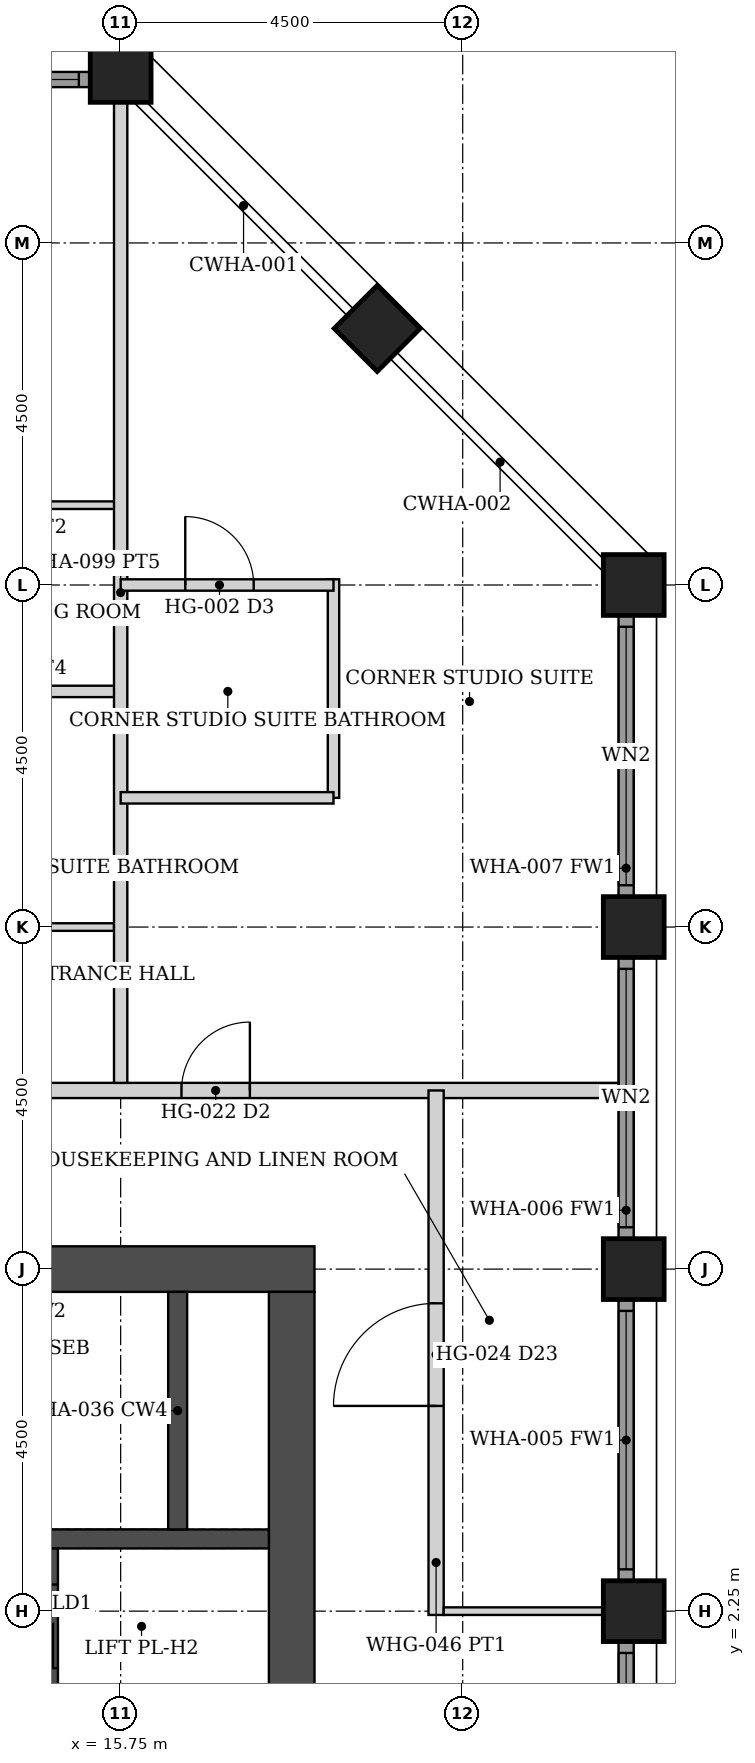
"""IFC4 building model, lengths in metres.
Left out: names, types, materials, properties, quantities, classifications, styles, units other than length and angle.
Written with IfcOpenShell. Run it as: python <this file> out.ifc"""

import sys

from ifc_helpers import new_model, si_unit, direction, frame, frame_2d, origin, origin_2d, place, context, subcontext, project, spatial, rectangle, hollow_rectangle, extrude, element, fill, save


model = new_model("IFC4")
c1 = context("Model", 3, precision=1e-05, world=origin(), true_north=direction((0.0, 1.0)))
c2 = subcontext(c1, "Body", "Model", "MODEL_VIEW")
j1 = project(units=[si_unit("LENGTHUNIT", "METRE"), si_unit("PLANEANGLEUNIT", "RADIAN")], contexts=[c1])
p1 = place(None, origin())
s1 = spatial("IfcSite", under=j1, at=p1, CompositionType="ELEMENT")
p2 = place(p1, origin())
s2 = spatial("IfcBuilding", under=s1, at=p2, CompositionType="ELEMENT")
p3 = place(p2, frame((0.0, 0.0, 183.2)))
s3 = spatial("IfcBuildingStorey", under=s2, at=p3, CompositionType="ELEMENT", Elevation=183.2)
for number, where, z_axis, x_axis in (
    (1, (22.5, 2.25, 0.0), (0.0, 0.0, 1.0), (1.0, 0.0, 0.0)),
    (2, (22.5, 6.75, 0.0), (0.0, 0.0, 1.0), (1.0, 0.0, 0.0)),
    (3, (22.5, 11.25, 0.0), (0.0, 0.0, 1.0), (1.0, 0.0, 0.0)),
    (4, (15.75, 22.5, 0.0), (0.0, 0.0, 1.0), (0.0, 1.0, 0.0)),
    (5, (22.5, 15.75, 0.0), (0.0, 0.0, 1.0), (1.0, 0.0, 0.0)),
    (6, (19.125, 19.125, 0.0), (0.0, 0.0, 1.0), (0.707, 0.707, 0.0)),
):
    element("IfcColumn", number, at=place(p3, frame(where, z_axis=z_axis, x_axis=x_axis)), inside=s3, PredefinedType="COLUMN", context=c2, shape_type="SweptSolid", body=[
        extrude(hollow_rectangle(XDim=0.8, YDim=0.8, WallThickness=0.045, at=origin_2d()), origin(), (0.0, 0.0, 1.0), 3.6),
    ])
p4 = place(p3, frame((8.7, 6.75, 0.0), z_axis=(0.0, 0.0, 1.0), x_axis=(1.0, 0.0, 0.0)))
e7 = element("IfcWall", 7, at=p4, inside=s3, PredefinedType="SHEAR", context=c2, shape_type="SweptSolid", body=[
    extrude(rectangle(XDim=9.6, YDim=0.6, at=frame_2d((4.8, 0.0))), origin(), (0.0, 0.0, 1.0), 3.6),
])
p5 = place(p3, frame((18.0, -6.45, 0.0), z_axis=(0.0, 0.0, 1.0), x_axis=(0.0, 1.0, 0.0)))
e8 = element("IfcWall", 8, at=p5, inside=s3, PredefinedType="SHEAR", context=c2, shape_type="SweptSolid", body=[
    extrude(rectangle(XDim=12.9, YDim=0.6, at=frame_2d((6.45, 0.0))), origin(), (0.0, 0.0, 1.0), 3.6),
])
p6 = place(p3, frame((9.3, 3.2, 0.0), z_axis=(0.0, 0.0, 1.0), x_axis=(1.0, 0.0, 0.0)))
e9 = element("IfcWall", 9, at=p6, inside=s3, PredefinedType="SHEAR", context=c2, shape_type="SweptSolid", body=[
    extrude(rectangle(XDim=8.4, YDim=0.25, at=frame_2d((4.2, 0.0))), origin(), (0.0, 0.0, 1.0), 3.6),
])
p7 = place(p3, frame((16.5, 3.325, 0.0), z_axis=(0.0, 0.0, 1.0), x_axis=(0.0, 1.0, 0.0)))
e10 = element("IfcWall", 10, at=p7, inside=s3, PredefinedType="SHEAR", context=c2, shape_type="SweptSolid", body=[
    extrude(rectangle(XDim=3.125, YDim=0.25, at=frame_2d((1.562, 0.0))), origin(), (0.0, 0.0, 1.0), 3.6),
])
p8 = place(p3, frame((14.8, -3.075, 0.0), z_axis=(0.0, 0.0, 1.0), x_axis=(0.0, 1.0, 0.0)))
e11 = element("IfcWall", 11, at=p8, inside=s3, PredefinedType="SHEAR", context=c2, shape_type="SweptSolid", body=[
    extrude(rectangle(XDim=6.15, YDim=0.25, at=frame_2d((3.075, 0.0))), origin(), (0.0, 0.0, 1.0), 3.6),
])
p9 = place(p8, frame((2.4, 0.0, 0.0)))
e12 = element("IfcOpeningElement", 12, at=p9, cuts=e11, PredefinedType="OPENING", context=c2, shape_type="SweptSolid", body=[
    extrude(rectangle(XDim=1.1, YDim=2.1, at=frame_2d((0.55, 1.05))), frame((0.0, 0.135, 0.0), z_axis=(0.0, -1.0, 0.0), x_axis=(1.0, 0.0, 0.0)), (0.0, 0.0, 1.0), 0.27),
])
p10 = place(p8, frame((4.575, 0.0, 0.0)))
e13 = element("IfcOpeningElement", 13, at=p10, cuts=e11, PredefinedType="OPENING", context=c2, shape_type="SweptSolid", body=[
    extrude(rectangle(XDim=1.1, YDim=2.1, at=frame_2d((0.55, 1.05))), frame((0.0, 0.135, 0.0), z_axis=(0.0, -1.0, 0.0), x_axis=(1.0, 0.0, 0.0)), (0.0, 0.0, 1.0), 0.27),
])
p11 = place(p3, frame((22.4, -1.845, 0.0), z_axis=(0.0, 0.0, 1.0), x_axis=(0.0, 1.0, 0.0)))
e14 = element("IfcWall", 14, at=p11, inside=s3, PredefinedType="SOLIDWALL", context=c2, shape_type="SweptSolid", body=[
    extrude(rectangle(XDim=3.69, YDim=0.2, at=frame_2d((1.845, 0.0))), origin(), (0.0, 0.0, 1.0), 2.479),
])
p12 = place(p11, frame((0.145, 0.0, 0.3)))
e15 = element("IfcOpeningElement", 15, at=p12, cuts=e14, PredefinedType="OPENING", context=c2, shape_type="SweptSolid", body=[
    extrude(rectangle(XDim=3.4, YDim=2.029, at=frame_2d((1.7, 1.015))), frame((0.0, 0.11, 0.0), z_axis=(0.0, -1.0, 0.0), x_axis=(1.0, 0.0, 0.0)), (0.0, 0.0, 1.0), 0.22),
])
p13 = place(p3, frame((22.4, 2.655, 0.0), z_axis=(0.0, 0.0, 1.0), x_axis=(0.0, 1.0, 0.0)))
e16 = element("IfcWall", 16, at=p13, inside=s3, PredefinedType="SOLIDWALL", context=c2, shape_type="SweptSolid", body=[
    extrude(rectangle(XDim=3.69, YDim=0.2, at=frame_2d((1.845, 0.0))), origin(), (0.0, 0.0, 1.0), 2.479),
])
p14 = place(p13, frame((0.145, 0.0, 0.3)))
e17 = element("IfcOpeningElement", 17, at=p14, cuts=e16, PredefinedType="OPENING", context=c2, shape_type="SweptSolid", body=[
    extrude(rectangle(XDim=3.4, YDim=2.029, at=frame_2d((1.7, 1.015))), frame((0.0, 0.11, 0.0), z_axis=(0.0, -1.0, 0.0), x_axis=(1.0, 0.0, 0.0)), (0.0, 0.0, 1.0), 0.22),
])
p15 = place(p3, frame((22.4, 7.155, 0.0), z_axis=(0.0, 0.0, 1.0), x_axis=(0.0, 1.0, 0.0)))
e18 = element("IfcWall", 18, at=p15, inside=s3, PredefinedType="SOLIDWALL", context=c2, shape_type="SweptSolid", body=[
    extrude(rectangle(XDim=3.69, YDim=0.2, at=frame_2d((1.845, 0.0))), origin(), (0.0, 0.0, 1.0), 2.479),
])
p16 = place(p15, frame((0.145, 0.0, 0.3)))
e19 = element("IfcOpeningElement", 19, at=p16, cuts=e18, PredefinedType="OPENING", context=c2, shape_type="SweptSolid", body=[
    extrude(rectangle(XDim=3.4, YDim=2.029, at=frame_2d((1.7, 1.015))), frame((0.0, 0.11, 0.0), z_axis=(0.0, -1.0, 0.0), x_axis=(1.0, 0.0, 0.0)), (0.0, 0.0, 1.0), 0.22),
])
p17 = place(p3, frame((22.4, 11.655, 0.0), z_axis=(0.0, 0.0, 1.0), x_axis=(0.0, 1.0, 0.0)))
e20 = element("IfcWall", 20, at=p17, inside=s3, PredefinedType="SOLIDWALL", context=c2, shape_type="SweptSolid", body=[
    extrude(rectangle(XDim=3.69, YDim=0.2, at=frame_2d((1.845, 0.0))), origin(), (0.0, 0.0, 1.0), 2.479),
])
p18 = place(p17, frame((0.145, 0.0, 0.3)))
e21 = element("IfcOpeningElement", 21, at=p18, cuts=e20, PredefinedType="OPENING", context=c2, shape_type="SweptSolid", body=[
    extrude(rectangle(XDim=3.4, YDim=2.029, at=frame_2d((1.7, 1.015))), frame((0.0, 0.11, 0.0), z_axis=(0.0, -1.0, 0.0), x_axis=(1.0, 0.0, 0.0)), (0.0, 0.0, 1.0), 0.22),
])
p19 = place(p3, frame((11.655, 22.4, 0.0), z_axis=(0.0, 0.0, 1.0), x_axis=(1.0, 0.0, 0.0)))
e22 = element("IfcWall", 22, at=p19, inside=s3, PredefinedType="SOLIDWALL", context=c2, shape_type="SweptSolid", body=[
    extrude(rectangle(XDim=3.69, YDim=0.2, at=frame_2d((1.845, 0.0))), origin(), (0.0, 0.0, 1.0), 2.479),
])
p20 = place(p19, frame((0.145, 0.0, 0.3)))
e23 = element("IfcOpeningElement", 23, at=p20, cuts=e22, PredefinedType="OPENING", context=c2, shape_type="SweptSolid", body=[
    extrude(rectangle(XDim=3.4, YDim=2.029, at=frame_2d((1.7, 1.015))), frame((0.0, 0.11, 0.0), z_axis=(0.0, -1.0, 0.0), x_axis=(1.0, 0.0, 0.0)), (0.0, 0.0, 1.0), 0.22),
])
p21 = place(p3, frame((-22.3, 9.1, 0.0), z_axis=(0.0, 0.0, 1.0), x_axis=(1.0, 0.0, 0.0)))
e24 = element("IfcWall", 24, at=p21, inside=s3, PredefinedType="PARTITIONING", context=c2, shape_type="SweptSolid", body=[
    extrude(rectangle(XDim=44.6, YDim=0.2, at=frame_2d((22.3, 0.0))), origin(), (0.0, 0.0, 1.0), 2.473),
])
p22 = place(p21, frame((11.35, 0.0, 0.0)))
e25 = element("IfcOpeningElement", 25, at=p22, cuts=e24, PredefinedType="OPENING", context=c2, shape_type="SweptSolid", body=[
    extrude(rectangle(XDim=0.9, YDim=2.1, at=frame_2d((0.45, 1.05))), frame((0.0, 0.11, 0.0), z_axis=(0.0, -1.0, 0.0), x_axis=(1.0, 0.0, 0.0)), (0.0, 0.0, 1.0), 0.22),
])
p23 = place(p21, frame((15.75, 0.0, 0.0)))
e26 = element("IfcOpeningElement", 26, at=p23, cuts=e24, PredefinedType="OPENING", context=c2, shape_type="SweptSolid", body=[
    extrude(rectangle(XDim=0.9, YDim=2.1, at=frame_2d((0.45, 1.05))), frame((0.0, 0.11, 0.0), z_axis=(0.0, -1.0, 0.0), x_axis=(1.0, 0.0, 0.0)), (0.0, 0.0, 1.0), 0.22),
])
p24 = place(p21, frame((23.45, 0.0, 0.0)))
e27 = element("IfcOpeningElement", 27, at=p24, cuts=e24, PredefinedType="OPENING", context=c2, shape_type="SweptSolid", body=[
    extrude(rectangle(XDim=0.9, YDim=2.1, at=frame_2d((0.45, 1.05))), frame((0.0, 0.11, 0.0), z_axis=(0.0, -1.0, 0.0), x_axis=(1.0, 0.0, 0.0)), (0.0, 0.0, 1.0), 0.22),
])
p25 = place(p21, frame((24.75, 0.0, 0.0)))
e28 = element("IfcOpeningElement", 28, at=p25, cuts=e24, PredefinedType="OPENING", context=c2, shape_type="SweptSolid", body=[
    extrude(rectangle(XDim=0.9, YDim=2.1, at=frame_2d((0.45, 1.05))), frame((0.0, 0.11, 0.0), z_axis=(0.0, -1.0, 0.0), x_axis=(1.0, 0.0, 0.0)), (0.0, 0.0, 1.0), 0.22),
])
p26 = place(p21, frame((29.35, 0.0, 0.0)))
e29 = element("IfcOpeningElement", 29, at=p26, cuts=e24, PredefinedType="OPENING", context=c2, shape_type="SweptSolid", body=[
    extrude(rectangle(XDim=0.9, YDim=2.1, at=frame_2d((0.45, 1.05))), frame((0.0, 0.11, 0.0), z_axis=(0.0, -1.0, 0.0), x_axis=(1.0, 0.0, 0.0)), (0.0, 0.0, 1.0), 0.22),
])
p27 = place(p21, frame((38.85, 0.0, 0.0)))
e30 = element("IfcOpeningElement", 30, at=p27, cuts=e24, PredefinedType="OPENING", context=c2, shape_type="SweptSolid", body=[
    extrude(rectangle(XDim=0.9, YDim=2.1, at=frame_2d((0.45, 1.05))), frame((0.0, 0.11, 0.0), z_axis=(0.0, -1.0, 0.0), x_axis=(1.0, 0.0, 0.0)), (0.0, 0.0, 1.0), 0.22),
])
p28 = place(p21, frame((4.85, 0.0, 0.0)))
e31 = element("IfcOpeningElement", 31, at=p28, cuts=e24, PredefinedType="OPENING", context=c2, shape_type="SweptSolid", body=[
    extrude(rectangle(XDim=0.9, YDim=2.1, at=frame_2d((0.45, 1.05))), frame((0.0, 0.11, 0.0), z_axis=(0.0, -1.0, 0.0), x_axis=(1.0, 0.0, 0.0)), (0.0, 0.0, 1.0), 0.22),
])
p29 = place(p3, frame((19.9, 2.2, 0.0), z_axis=(0.0, 0.0, 1.0), x_axis=(0.0, 1.0, 0.0)))
e32 = element("IfcWall", 32, at=p29, inside=s3, PredefinedType="PARTITIONING", context=c2, shape_type="SweptSolid", body=[
    extrude(rectangle(XDim=6.9, YDim=0.2, at=frame_2d((3.45, 0.0))), origin(), (0.0, 0.0, 1.0), 2.473),
])
p30 = place(p29, frame((2.75, 0.0, 0.0)))
e33 = element("IfcOpeningElement", 33, at=p30, cuts=e32, PredefinedType="OPENING", context=c2, shape_type="SweptSolid", body=[
    extrude(rectangle(XDim=1.35, YDim=2.1, at=frame_2d((0.675, 1.05))), frame((0.0, 0.11, 0.0), z_axis=(0.0, -1.0, 0.0), x_axis=(1.0, 0.0, 0.0)), (0.0, 0.0, 1.0), 0.22),
])
p31 = place(p3, frame((6.837, 11.25, 0.0), z_axis=(0.0, 0.0, 1.0), x_axis=(1.0, 0.0, 0.0)))
e34 = element("IfcWall", 34, at=p31, inside=s3, PredefinedType="PARTITIONING", context=c2, shape_type="SweptSolid", body=[
    extrude(rectangle(XDim=8.825, YDim=0.1, at=frame_2d((4.413, 0.0))), origin(), (0.0, 0.0, 1.0), 2.473),
])
p32 = place(p31, frame((0.863, 0.0, 0.0)))
e35 = element("IfcOpeningElement", 35, at=p32, cuts=e34, PredefinedType="OPENING", context=c2, shape_type="SweptSolid", body=[
    extrude(rectangle(XDim=0.9, YDim=2.1, at=frame_2d((0.45, 1.05))), frame((0.0, 0.06, 0.0), z_axis=(0.0, -1.0, 0.0), x_axis=(1.0, 0.0, 0.0)), (0.0, 0.0, 1.0), 0.12),
])
p33 = place(p31, frame((3.113, 0.0, 0.0)))
e36 = element("IfcOpeningElement", 36, at=p33, cuts=e34, PredefinedType="OPENING", context=c2, shape_type="SweptSolid", body=[
    extrude(rectangle(XDim=0.9, YDim=2.1, at=frame_2d((0.45, 1.05))), frame((0.0, 0.06, 0.0), z_axis=(0.0, -1.0, 0.0), x_axis=(1.0, 0.0, 0.0)), (0.0, 0.0, 1.0), 0.12),
])
p34 = place(p31, frame((4.637, 0.0, 0.0)))
e37 = element("IfcOpeningElement", 37, at=p34, cuts=e34, PredefinedType="OPENING", context=c2, shape_type="SweptSolid", body=[
    extrude(rectangle(XDim=0.85, YDim=2.1, at=frame_2d((0.425, 1.05))), frame((0.0, 0.06, 0.0), z_axis=(0.0, -1.0, 0.0), x_axis=(1.0, 0.0, 0.0)), (0.0, 0.0, 1.0), 0.12),
])
p35 = place(p3, frame((12.55, 14.35, 0.0), z_axis=(0.0, 0.0, 1.0), x_axis=(1.0, 0.0, 0.0)))
e38 = element("IfcWall", 38, at=p35, inside=s3, PredefinedType="PARTITIONING", context=c2, shape_type="SweptSolid", body=[
    extrude(rectangle(XDim=3.14, YDim=0.15, at=frame_2d((1.57, 0.0))), origin(), (0.0, 0.0, 1.0), 2.473),
])
p36 = place(p3, frame((12.55, 16.8, 0.0), z_axis=(0.0, 0.0, 1.0), x_axis=(1.0, 0.0, 0.0)))
e39 = element("IfcWall", 39, at=p36, inside=s3, PredefinedType="PARTITIONING", context=c2, shape_type="SweptSolid", body=[
    extrude(rectangle(XDim=3.14, YDim=0.1, at=frame_2d((1.57, 0.0))), origin(), (0.0, 0.0, 1.0), 2.473),
])
p37 = place(p3, frame((15.75, 9.2, 0.0), z_axis=(0.0, 0.0, 1.0), x_axis=(0.0, 1.0, 0.0)))
e40 = element("IfcWall", 40, at=p37, inside=s3, PredefinedType="PARTITIONING", context=c2, shape_type="SweptSolid", body=[
    extrude(rectangle(XDim=12.9, YDim=0.175, at=frame_2d((6.45, 0.0))), origin(), (0.0, 0.0, 1.0), 2.473),
])
p38 = place(p3, frame((18.55, 12.95, 0.0), z_axis=(0.0, 0.0, 1.0), x_axis=(0.0, 1.0, 0.0)))
e41 = element("IfcWall", 41, at=p38, inside=s3, PredefinedType="PARTITIONING", context=c2, shape_type="SweptSolid", body=[
    extrude(rectangle(XDim=2.875, YDim=0.15, at=frame_2d((1.438, 0.0))), origin(), (0.0, 0.0, 1.0), 2.473),
])
p39 = place(p3, frame((15.75, 12.95, 0.0), z_axis=(0.0, 0.0, 1.0), x_axis=(1.0, 0.0, 0.0)))
e42 = element("IfcWall", 42, at=p39, inside=s3, PredefinedType="PARTITIONING", context=c2, shape_type="SweptSolid", body=[
    extrude(rectangle(XDim=2.8, YDim=0.15, at=frame_2d((1.4, 0.0))), origin(), (0.0, 0.0, 1.0), 2.473),
])
p40 = place(p3, frame((15.75, 15.75, 0.0), z_axis=(0.0, 0.0, 1.0), x_axis=(1.0, 0.0, 0.0)))
e43 = element("IfcWall", 43, at=p40, inside=s3, PredefinedType="PARTITIONING", context=c2, shape_type="SweptSolid", body=[
    extrude(rectangle(XDim=2.8, YDim=0.15, at=frame_2d((1.4, 0.0))), origin(), (0.0, 0.0, 1.0), 2.473),
])
p41 = place(p40, frame((0.85, 0.0, 0.0)))
e44 = element("IfcOpeningElement", 44, at=p41, cuts=e43, PredefinedType="OPENING", context=c2, shape_type="SweptSolid", body=[
    extrude(rectangle(XDim=0.9, YDim=2.1, at=frame_2d((0.45, 1.05))), frame((0.0, 0.085, 0.0), z_axis=(0.0, -1.0, 0.0), x_axis=(1.0, 0.0, 0.0)), (0.0, 0.0, 1.0), 0.17),
])
p42 = place(p3, frame((20.0, 2.25, 0.0), z_axis=(0.0, 0.0, 1.0), x_axis=(1.0, 0.0, 0.0)))
e45 = element("IfcWall", 45, at=p42, inside=s3, PredefinedType="PARTITIONING", context=c2, shape_type="SweptSolid", body=[
    extrude(rectangle(XDim=2.1, YDim=0.1, at=frame_2d((1.05, 0.0))), origin(), (0.0, 0.0, 1.0), 2.473),
])
p43 = place(p12, origin())
e46 = element("IfcWindow", 46, at=p43, inside=s3, PartitioningType="SINGLE_PANEL", PredefinedType="WINDOW", context=c2, shape_type="SweptSolid", body=[
    extrude(rectangle(XDim=3.4, YDim=2.029, at=frame_2d((1.7, 1.015))), frame((0.0, 0.03, 0.0), z_axis=(0.0, -1.0, 0.0), x_axis=(1.0, 0.0, 0.0)), (0.0, 0.0, 1.0), 0.06),
])
fill(e15, e46)
p44 = place(p14, origin())
e47 = element("IfcWindow", 47, at=p44, inside=s3, PartitioningType="SINGLE_PANEL", PredefinedType="WINDOW", context=c2, shape_type="SweptSolid", body=[
    extrude(rectangle(XDim=3.4, YDim=2.029, at=frame_2d((1.7, 1.015))), frame((0.0, 0.03, 0.0), z_axis=(0.0, -1.0, 0.0), x_axis=(1.0, 0.0, 0.0)), (0.0, 0.0, 1.0), 0.06),
])
fill(e17, e47)
p45 = place(p16, origin())
e48 = element("IfcWindow", 48, at=p45, inside=s3, PartitioningType="SINGLE_PANEL", PredefinedType="WINDOW", context=c2, shape_type="SweptSolid", body=[
    extrude(rectangle(XDim=3.4, YDim=2.029, at=frame_2d((1.7, 1.015))), frame((0.0, 0.03, 0.0), z_axis=(0.0, -1.0, 0.0), x_axis=(1.0, 0.0, 0.0)), (0.0, 0.0, 1.0), 0.06),
])
fill(e19, e48)
p46 = place(p18, origin())
e49 = element("IfcWindow", 49, at=p46, inside=s3, PartitioningType="SINGLE_PANEL", PredefinedType="WINDOW", context=c2, shape_type="SweptSolid", body=[
    extrude(rectangle(XDim=3.4, YDim=2.029, at=frame_2d((1.7, 1.015))), frame((0.0, 0.03, 0.0), z_axis=(0.0, -1.0, 0.0), x_axis=(1.0, 0.0, 0.0)), (0.0, 0.0, 1.0), 0.06),
])
fill(e21, e49)
p47 = place(p20, origin())
e50 = element("IfcWindow", 50, at=p47, inside=s3, PartitioningType="SINGLE_PANEL", PredefinedType="WINDOW", context=c2, shape_type="SweptSolid", body=[
    extrude(rectangle(XDim=3.4, YDim=2.029, at=frame_2d((1.7, 1.015))), frame((0.0, 0.03, 0.0), z_axis=(0.0, -1.0, 0.0), x_axis=(1.0, 0.0, 0.0)), (0.0, 0.0, 1.0), 0.06),
])
fill(e23, e50)
p48 = place(p27, origin())
e51 = element("IfcDoor", 51, at=p48, inside=s3, OperationType="SINGLE_SWING_RIGHT", PredefinedType="DOOR", context=c2, shape_type="SweptSolid", body=[
    extrude(rectangle(XDim=0.9, YDim=2.1, at=frame_2d((0.45, 1.05))), frame((0.0, 0.025, 0.0), z_axis=(0.0, -1.0, 0.0), x_axis=(1.0, 0.0, 0.0)), (0.0, 0.0, 1.0), 0.05),
])
fill(e30, e51)
p49 = place(p41, origin())
e52 = element("IfcDoor", 52, at=p49, inside=s3, OperationType="SINGLE_SWING_LEFT", PredefinedType="DOOR", context=c2, shape_type="SweptSolid", body=[
    extrude(rectangle(XDim=0.9, YDim=2.1, at=frame_2d((0.45, 1.05))), frame((0.0, 0.025, 0.0), z_axis=(0.0, -1.0, 0.0), x_axis=(1.0, 0.0, 0.0)), (0.0, 0.0, 1.0), 0.05),
])
fill(e44, e52)
p50 = place(p30, origin())
e53 = element("IfcDoor", 53, at=p50, inside=s3, OperationType="SINGLE_SWING_LEFT", PredefinedType="DOOR", context=c2, shape_type="SweptSolid", body=[
    extrude(rectangle(XDim=1.35, YDim=2.1, at=frame_2d((0.675, 1.05))), frame((0.0, 0.025, 0.0), z_axis=(0.0, -1.0, 0.0), x_axis=(1.0, 0.0, 0.0)), (0.0, 0.0, 1.0), 0.05),
])
fill(e33, e53)
save(model, sys.argv[1])
